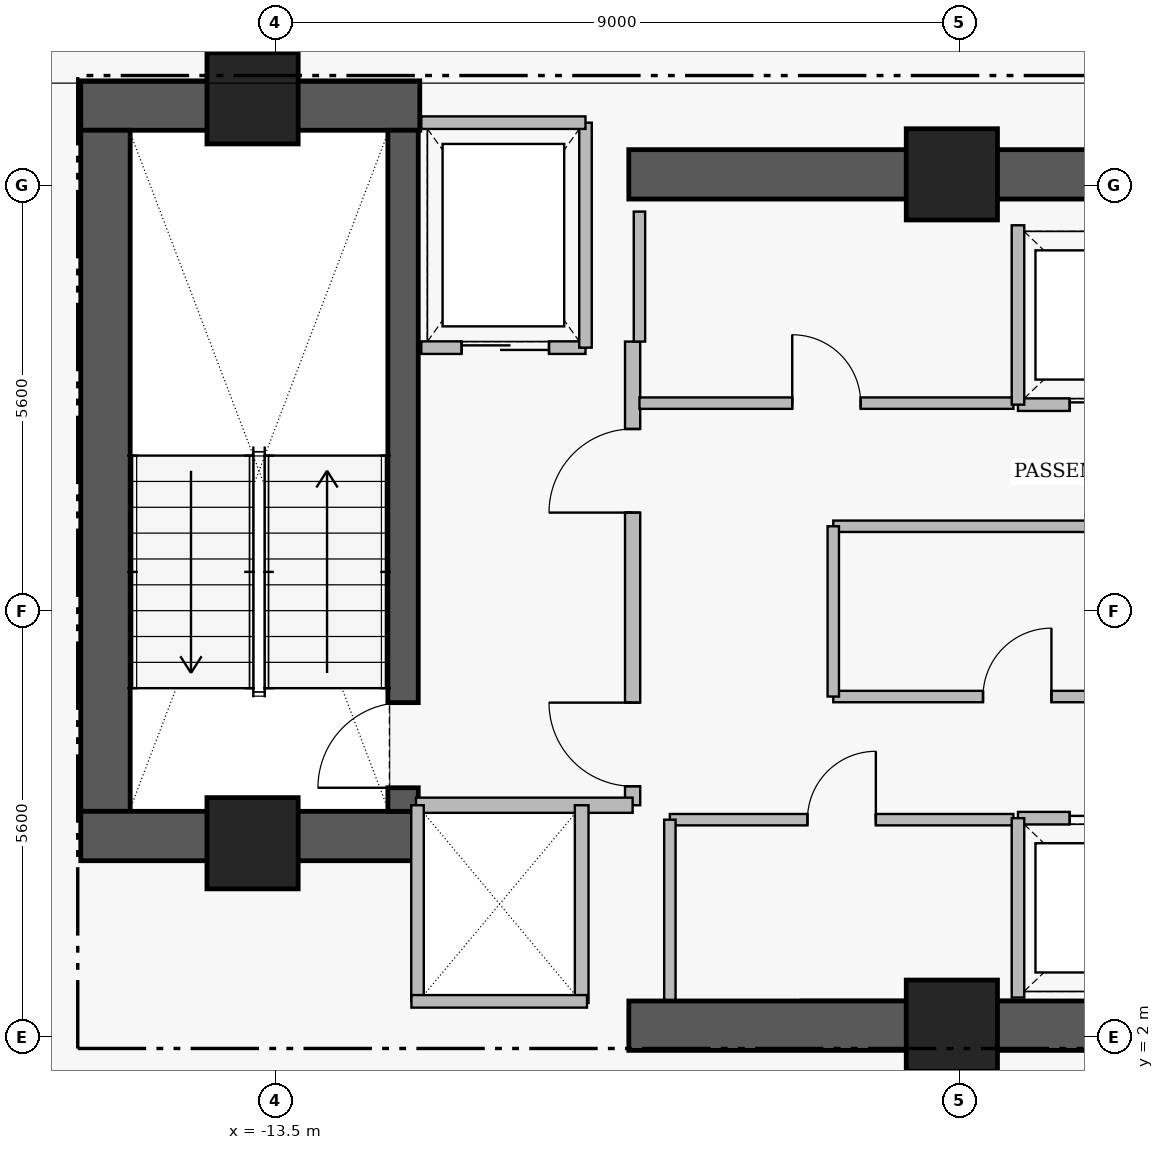
"""IFC4 building model, lengths in metres.
Left out: names, types, materials, properties, quantities, classifications, styles, units other than length and angle.
Written with IfcOpenShell. Run it as: python <this file> out.ifc"""

import sys

from ifc_helpers import new_model, si_unit, direction, frame, frame_2d, origin, origin_2d, place, context, subcontext, project, spatial, rectangle, extrude, element, fill, save


model = new_model("IFC4")
c1 = context("Model", 3, precision=1e-05, world=origin(), true_north=direction((0.0, 1.0)))
c2 = subcontext(c1, "Body", "Model", "MODEL_VIEW")
j1 = project(units=[si_unit("LENGTHUNIT", "METRE"), si_unit("PLANEANGLEUNIT", "RADIAN")], contexts=[c1])
p1 = place(None, origin())
s1 = spatial("IfcSite", under=j1, at=p1, CompositionType="ELEMENT")
p2 = place(p1, origin())
s2 = spatial("IfcBuilding", under=s1, at=p2, CompositionType="ELEMENT")
p3 = place(p2, frame((0.0, 0.0, 222.4)))
s3 = spatial("IfcBuildingStorey", under=s2, at=p3, CompositionType="ELEMENT", Elevation=222.4)
p4 = place(p3, frame((-16.06, 14.255, 0.0), z_axis=(0.0, 0.0, 1.0), x_axis=(1.0, 0.0, 0.0)))
e1 = element("IfcWall", 1, at=p4, inside=s3, PredefinedType="SHEAR", context=c2, shape_type="SweptSolid", body=[
    extrude(rectangle(XDim=4.46, YDim=0.65, at=frame_2d((2.23, 0.0))), origin(), (0.0, 0.0, 1.0), 3.56),
])
p5 = place(p3, frame((-15.735, 4.97, 0.0), z_axis=(0.0, 0.0, 1.0), x_axis=(0.0, 1.0, 0.0)))
e2 = element("IfcWall", 2, at=p5, inside=s3, PredefinedType="SHEAR", context=c2, shape_type="SweptSolid", body=[
    extrude(rectangle(XDim=8.96, YDim=0.65, at=frame_2d((4.48, 0.0))), origin(), (0.0, 0.0, 1.0), 3.56),
])
p6 = place(p3, frame((-16.06, 4.645, 0.0), z_axis=(0.0, 0.0, 1.0), x_axis=(1.0, 0.0, 0.0)))
e3 = element("IfcWall", 3, at=p6, inside=s3, PredefinedType="SHEAR", context=c2, shape_type="SweptSolid", body=[
    extrude(rectangle(XDim=4.46, YDim=0.65, at=frame_2d((2.23, 0.0))), origin(), (0.0, 0.0, 1.0), 3.56),
])
for number, where, z_axis, x_axis in (
    (4, (-8.85, 2.15, 0.0), (0.0, 0.0, 1.0), (1.0, 0.0, 0.0)),
    (5, (-8.85, 13.35, 0.0), (0.0, 0.0, 1.0), (1.0, 0.0, 0.0)),
):
    element("IfcWall", number, at=place(p3, frame(where, z_axis=z_axis, x_axis=x_axis)), inside=s3, PredefinedType="SHEAR", context=c2, shape_type="SweptSolid", body=[
        extrude(rectangle(XDim=7.6, YDim=0.65, at=frame_2d((3.8, 0.0))), origin(), (0.0, 0.0, 1.0), 3.53),
    ])
p7 = place(p3, frame((-11.82, 4.97, 0.0), z_axis=(0.0, 0.0, 1.0), x_axis=(0.0, 1.0, 0.0)))
e6 = element("IfcWall", 6, at=p7, inside=s3, PredefinedType="SHEAR", context=c2, shape_type="SweptSolid", body=[
    extrude(rectangle(XDim=8.96, YDim=0.4, at=frame_2d((4.48, 0.0))), origin(), (0.0, 0.0, 1.0), 3.56),
])
p8 = place(p7, frame((0.31, 0.0, 0.0)))
e7 = element("IfcOpeningElement", 7, at=p8, cuts=e6, PredefinedType="OPENING", context=c2, shape_type="SweptSolid", body=[
    extrude(rectangle(XDim=1.12, YDim=2.22, at=frame_2d((0.56, 1.11))), frame((0.0, 0.21, 0.0), z_axis=(0.0, -1.0, 0.0), x_axis=(1.0, 0.0, 0.0)), (0.0, 0.0, 1.0), 0.42),
])
for number, where, z_axis, x_axis in (
    (8, (-13.8, 14.35, 0.0), (0.0, 0.0, 1.0), (1.0, 0.0, 0.0)),
    (9, (-4.6, 13.35, 0.0), (0.0, 0.0, 1.0), (1.0, 0.0, 0.0)),
    (10, (-13.8, 4.55, 0.0), (0.0, 0.0, 1.0), (1.0, 0.0, 0.0)),
    (11, (-4.6, 2.15, 0.0), (0.0, 0.0, 1.0), (1.0, 0.0, 0.0)),
):
    element("IfcColumn", number, at=place(p3, frame(where, z_axis=z_axis, x_axis=x_axis)), inside=s3, PredefinedType="COLUMN", context=c2, shape_type="SweptSolid", body=[
        extrude(rectangle(XDim=1.2, YDim=1.2, at=origin_2d()), origin(), (0.0, 0.0, 1.0), 3.75),
    ])
p9 = place(p3, frame((-8.8, 5.05, 0.0), z_axis=(0.0, 0.0, 1.0), x_axis=(0.0, 1.0, 0.0)))
e12 = element("IfcWall", 12, at=p9, inside=s3, PredefinedType="PARTITIONING", context=c2, shape_type="SweptSolid", body=[
    extrude(rectangle(XDim=6.1, YDim=0.2, at=frame_2d((3.05, 0.0))), origin(), (0.0, 0.0, 1.0), 3.53),
])
p10 = place(p9, frame((0.25, 0.0, 0.0)))
e13 = element("IfcOpeningElement", 13, at=p10, cuts=e12, PredefinedType="OPENING", context=c2, shape_type="SweptSolid", body=[
    extrude(rectangle(XDim=1.1, YDim=2.2, at=frame_2d((0.55, 1.1))), frame((0.0, 0.11, 0.0), z_axis=(0.0, -1.0, 0.0), x_axis=(1.0, 0.0, 0.0)), (0.0, 0.0, 1.0), 0.22),
])
p11 = place(p9, frame((3.85, 0.0, 0.0)))
e14 = element("IfcOpeningElement", 14, at=p11, cuts=e12, PredefinedType="OPENING", context=c2, shape_type="SweptSolid", body=[
    extrude(rectangle(XDim=1.1, YDim=2.2, at=frame_2d((0.55, 1.1))), frame((0.0, 0.11, 0.0), z_axis=(0.0, -1.0, 0.0), x_axis=(1.0, 0.0, 0.0)), (0.0, 0.0, 1.0), 0.22),
])
p12 = place(p3, frame((-11.58, 11.07, 0.0), z_axis=(0.0, 0.0, 1.0), x_axis=(1.0, 0.0, 0.0)))
e15 = element("IfcWall", 15, at=p12, inside=s3, PredefinedType="PARTITIONING", context=c2, shape_type="SweptSolid", body=[
    extrude(rectangle(XDim=2.16, YDim=0.165, at=frame_2d((1.08, 0.0))), origin(), (0.0, 0.0, 1.0), 3.53),
])
p13 = place(p12, frame((0.53, 0.0, 0.0)))
e16 = element("IfcOpeningElement", 16, at=p13, cuts=e15, PredefinedType="OPENING", context=c2, shape_type="SweptSolid", body=[
    extrude(rectangle(XDim=1.15, YDim=2.25, at=frame_2d((0.575, 1.125))), frame((0.0, 0.093, 0.0), z_axis=(0.0, -1.0, 0.0), x_axis=(1.0, 0.0, 0.0)), (0.0, 0.0, 1.0), 0.185),
])
p14 = place(p3, frame((-3.73, 4.88, 0.0), z_axis=(0.0, 0.0, 1.0), x_axis=(1.0, 0.0, 0.0)))
e17 = element("IfcWall", 17, at=p14, inside=s3, PredefinedType="PARTITIONING", context=c2, shape_type="SweptSolid", body=[
    extrude(rectangle(XDim=2.46, YDim=0.165, at=frame_2d((1.23, 0.0))), origin(), (0.0, 0.0, 1.0), 3.53),
])
p15 = place(p14, frame((0.68, 0.0, 0.0)))
e18 = element("IfcOpeningElement", 18, at=p15, cuts=e17, PredefinedType="OPENING", context=c2, shape_type="SweptSolid", body=[
    extrude(rectangle(XDim=1.1, YDim=2.25, at=frame_2d((0.55, 1.125))), frame((0.0, 0.093, 0.0), z_axis=(0.0, -1.0, 0.0), x_axis=(1.0, 0.0, 0.0)), (0.0, 0.0, 1.0), 0.185),
])
p16 = place(p3, frame((-3.73, 10.32, 0.0), z_axis=(0.0, 0.0, 1.0), x_axis=(1.0, 0.0, 0.0)))
e19 = element("IfcWall", 19, at=p16, inside=s3, PredefinedType="PARTITIONING", context=c2, shape_type="SweptSolid", body=[
    extrude(rectangle(XDim=2.46, YDim=0.165, at=frame_2d((1.23, 0.0))), origin(), (0.0, 0.0, 1.0), 3.53),
])
p17 = place(p16, frame((0.68, 0.0, 0.0)))
e20 = element("IfcOpeningElement", 20, at=p17, cuts=e19, PredefinedType="OPENING", context=c2, shape_type="SweptSolid", body=[
    extrude(rectangle(XDim=1.1, YDim=2.25, at=frame_2d((0.55, 1.125))), frame((0.0, 0.093, 0.0), z_axis=(0.0, -1.0, 0.0), x_axis=(1.0, 0.0, 0.0)), (0.0, 0.0, 1.0), 0.185),
])
p18 = place(p3, frame((-8.31, 4.86, 0.0), z_axis=(0.0, 0.0, 1.0), x_axis=(1.0, 0.0, 0.0)))
e21 = element("IfcWall", 21, at=p18, inside=s3, PredefinedType="PARTITIONING", context=c2, shape_type="SweptSolid", body=[
    extrude(rectangle(XDim=4.52, YDim=0.15, at=frame_2d((2.26, 0.0))), origin(), (0.0, 0.0, 1.0), 3.53),
])
p19 = place(p18, frame((1.81, 0.0, 0.0)))
e22 = element("IfcOpeningElement", 22, at=p19, cuts=e21, PredefinedType="OPENING", context=c2, shape_type="SweptSolid", body=[
    extrude(rectangle(XDim=0.9, YDim=2.15, at=frame_2d((0.45, 1.075))), frame((0.0, 0.085, 0.0), z_axis=(0.0, -1.0, 0.0), x_axis=(1.0, 0.0, 0.0)), (0.0, 0.0, 1.0), 0.17),
])
p20 = place(p3, frame((-8.71, 10.34, 0.0), z_axis=(0.0, 0.0, 1.0), x_axis=(1.0, 0.0, 0.0)))
e23 = element("IfcWall", 23, at=p20, inside=s3, PredefinedType="PARTITIONING", context=c2, shape_type="SweptSolid", body=[
    extrude(rectangle(XDim=4.92, YDim=0.15, at=frame_2d((2.46, 0.0))), origin(), (0.0, 0.0, 1.0), 3.53),
])
p21 = place(p20, frame((2.01, 0.0, 0.0)))
e24 = element("IfcOpeningElement", 24, at=p21, cuts=e23, PredefinedType="OPENING", context=c2, shape_type="SweptSolid", body=[
    extrude(rectangle(XDim=0.9, YDim=2.15, at=frame_2d((0.45, 1.075))), frame((0.0, 0.085, 0.0), z_axis=(0.0, -1.0, 0.0), x_axis=(1.0, 0.0, 0.0)), (0.0, 0.0, 1.0), 0.17),
])
p22 = place(p3, frame((-6.16, 6.48, 0.0), z_axis=(0.0, 0.0, 1.0), x_axis=(1.0, 0.0, 0.0)))
e25 = element("IfcWall", 25, at=p22, inside=s3, PredefinedType="PARTITIONING", context=c2, shape_type="SweptSolid", body=[
    extrude(rectangle(XDim=4.84, YDim=0.15, at=frame_2d((2.42, 0.0))), origin(), (0.0, 0.0, 1.0), 3.53),
])
p23 = place(p22, frame((1.97, 0.0, 0.0)))
e26 = element("IfcOpeningElement", 26, at=p23, cuts=e25, PredefinedType="OPENING", context=c2, shape_type="SweptSolid", body=[
    extrude(rectangle(XDim=0.9, YDim=2.15, at=frame_2d((0.45, 1.075))), frame((0.0, 0.085, 0.0), z_axis=(0.0, -1.0, 0.0), x_axis=(1.0, 0.0, 0.0)), (0.0, 0.0, 1.0), 0.17),
])
p24 = place(p3, frame((-11.65, 5.05, 0.0), z_axis=(0.0, 0.0, 1.0), x_axis=(1.0, 0.0, 0.0)))
e27 = element("IfcWall", 27, at=p24, inside=s3, PredefinedType="PARTITIONING", context=c2, shape_type="SweptSolid", body=[
    extrude(rectangle(XDim=2.85, YDim=0.2, at=frame_2d((1.425, 0.0))), origin(), (0.0, 0.0, 1.0), 3.53),
])
p25 = place(p3, frame((-9.42, 11.07, 0.0), z_axis=(0.0, 0.0, 1.0), x_axis=(0.0, 1.0, 0.0)))
e28 = element("IfcWall", 28, at=p25, inside=s3, PredefinedType="PARTITIONING", context=c2, shape_type="SweptSolid", body=[
    extrude(rectangle(XDim=2.96, YDim=0.165, at=frame_2d((1.48, 0.0))), origin(), (0.0, 0.0, 1.0), 3.53),
])
p26 = place(p3, frame((-11.58, 14.03, 0.0), z_axis=(0.0, 0.0, 1.0), x_axis=(1.0, 0.0, 0.0)))
e29 = element("IfcWall", 29, at=p26, inside=s3, PredefinedType="PARTITIONING", context=c2, shape_type="SweptSolid", body=[
    extrude(rectangle(XDim=2.16, YDim=0.165, at=frame_2d((1.08, 0.0))), origin(), (0.0, 0.0, 1.0), 3.53),
])
for number, where, z_axis, x_axis in (
    (30, (-3.73, 2.52, 0.0), (0.0, 0.0, 1.0), (0.0, 1.0, 0.0)),
    (31, (-3.73, 10.32, 0.0), (0.0, 0.0, 1.0), (0.0, 1.0, 0.0)),
):
    element("IfcWall", number, at=place(p3, frame(where, z_axis=z_axis, x_axis=x_axis)), inside=s3, PredefinedType="PARTITIONING", context=c2, shape_type="SweptSolid", body=[
        extrude(rectangle(XDim=2.36, YDim=0.165, at=frame_2d((1.18, 0.0))), origin(), (0.0, 0.0, 1.0), 3.53),
    ])
p27 = place(p3, frame((-8.31, 2.49, 0.0), z_axis=(0.0, 0.0, 1.0), x_axis=(0.0, 1.0, 0.0)))
e32 = element("IfcWall", 32, at=p27, inside=s3, PredefinedType="PARTITIONING", context=c2, shape_type="SweptSolid", body=[
    extrude(rectangle(XDim=2.37, YDim=0.15, at=frame_2d((1.185, 0.0))), origin(), (0.0, 0.0, 1.0), 3.53),
])
p28 = place(p3, frame((-8.71, 11.15, 0.0), z_axis=(0.0, 0.0, 1.0), x_axis=(0.0, 1.0, 0.0)))
e33 = element("IfcWall", 33, at=p28, inside=s3, PredefinedType="PARTITIONING", context=c2, shape_type="SweptSolid", body=[
    extrude(rectangle(XDim=1.71, YDim=0.15, at=frame_2d((0.855, 0.0))), origin(), (0.0, 0.0, 1.0), 3.53),
])
p29 = place(p3, frame((-9.47, 2.45, 0.0), z_axis=(0.0, 0.0, 1.0), x_axis=(0.0, 1.0, 0.0)))
e34 = element("IfcWall", 34, at=p29, inside=s3, PredefinedType="PARTITIONING", context=c2, shape_type="SweptSolid", body=[
    extrude(rectangle(XDim=2.6, YDim=0.18, at=frame_2d((1.3, 0.0))), origin(), (0.0, 0.0, 1.0), 3.53),
])
p30 = place(p3, frame((-11.63, 2.47, 0.0), z_axis=(0.0, 0.0, 1.0), x_axis=(0.0, 1.0, 0.0)))
e35 = element("IfcWall", 35, at=p30, inside=s3, PredefinedType="PARTITIONING", context=c2, shape_type="SweptSolid", body=[
    extrude(rectangle(XDim=2.58, YDim=0.165, at=frame_2d((1.29, 0.0))), origin(), (0.0, 0.0, 1.0), 3.53),
])
p31 = place(p3, frame((-11.71, 2.47, 0.0), z_axis=(0.0, 0.0, 1.0), x_axis=(1.0, 0.0, 0.0)))
e36 = element("IfcWall", 36, at=p31, inside=s3, PredefinedType="PARTITIONING", context=c2, shape_type="SweptSolid", body=[
    extrude(rectangle(XDim=2.31, YDim=0.165, at=frame_2d((1.155, 0.0))), origin(), (0.0, 0.0, 1.0), 2.43),
])
p32 = place(p3, frame((-6.16, 8.72, 0.0), z_axis=(0.0, 0.0, 1.0), x_axis=(1.0, 0.0, 0.0)))
e37 = element("IfcWall", 37, at=p32, inside=s3, PredefinedType="PARTITIONING", context=c2, shape_type="SweptSolid", body=[
    extrude(rectangle(XDim=4.84, YDim=0.15, at=frame_2d((2.42, 0.0))), origin(), (0.0, 0.0, 1.0), 3.53),
])
p33 = place(p3, frame((-6.16, 6.48, 0.0), z_axis=(0.0, 0.0, 1.0), x_axis=(0.0, 1.0, 0.0)))
e38 = element("IfcWall", 38, at=p33, inside=s3, PredefinedType="PARTITIONING", context=c2, shape_type="SweptSolid", body=[
    extrude(rectangle(XDim=2.24, YDim=0.15, at=frame_2d((1.12, 0.0))), origin(), (0.0, 0.0, 1.0), 3.53),
])
p34 = place(p8, origin())
e39 = element("IfcDoor", 39, at=p34, inside=s3, OperationType="SINGLE_SWING_LEFT", PredefinedType="DOOR", context=c2, shape_type="SweptSolid", body=[
    extrude(rectangle(XDim=1.12, YDim=2.22, at=frame_2d((0.56, 1.11))), frame((0.0, 0.025, 0.0), z_axis=(0.0, -1.0, 0.0), x_axis=(1.0, 0.0, 0.0)), (0.0, 0.0, 1.0), 0.05),
])
fill(e7, e39)
p35 = place(p10, origin())
e40 = element("IfcDoor", 40, at=p35, inside=s3, OperationType="SINGLE_SWING_RIGHT", PredefinedType="DOOR", context=c2, shape_type="SweptSolid", body=[
    extrude(rectangle(XDim=1.1, YDim=2.2, at=frame_2d((0.55, 1.1))), frame((0.0, 0.025, 0.0), z_axis=(0.0, -1.0, 0.0), x_axis=(1.0, 0.0, 0.0)), (0.0, 0.0, 1.0), 0.05),
])
fill(e13, e40)
p36 = place(p11, origin())
e41 = element("IfcDoor", 41, at=p36, inside=s3, OperationType="SINGLE_SWING_LEFT", PredefinedType="DOOR", context=c2, shape_type="SweptSolid", body=[
    extrude(rectangle(XDim=1.1, YDim=2.2, at=frame_2d((0.55, 1.1))), frame((0.0, 0.025, 0.0), z_axis=(0.0, -1.0, 0.0), x_axis=(1.0, 0.0, 0.0)), (0.0, 0.0, 1.0), 0.05),
])
fill(e14, e41)
p37 = place(p13, origin())
e42 = element("IfcDoor", 42, at=p37, inside=s3, OperationType="SLIDING_TO_LEFT", PredefinedType="DOOR", context=c2, shape_type="SweptSolid", body=[
    extrude(rectangle(XDim=1.15, YDim=2.25, at=frame_2d((0.575, 1.125))), frame((0.0, 0.025, 0.0), z_axis=(0.0, -1.0, 0.0), x_axis=(1.0, 0.0, 0.0)), (0.0, 0.0, 1.0), 0.05),
])
fill(e16, e42)
p38 = place(p15, origin())
e43 = element("IfcDoor", 43, at=p38, inside=s3, OperationType="SLIDING_TO_LEFT", PredefinedType="DOOR", context=c2, shape_type="SweptSolid", body=[
    extrude(rectangle(XDim=1.1, YDim=2.25, at=frame_2d((0.55, 1.125))), frame((0.0, 0.025, 0.0), z_axis=(0.0, -1.0, 0.0), x_axis=(1.0, 0.0, 0.0)), (0.0, 0.0, 1.0), 0.05),
])
fill(e18, e43)
p39 = place(p17, origin())
e44 = element("IfcDoor", 44, at=p39, inside=s3, OperationType="SLIDING_TO_LEFT", PredefinedType="DOOR", context=c2, shape_type="SweptSolid", body=[
    extrude(rectangle(XDim=1.1, YDim=2.25, at=frame_2d((0.55, 1.125))), frame((0.0, 0.025, 0.0), z_axis=(0.0, -1.0, 0.0), x_axis=(1.0, 0.0, 0.0)), (0.0, 0.0, 1.0), 0.05),
])
fill(e20, e44)
p40 = place(p19, origin())
e45 = element("IfcDoor", 45, at=p40, inside=s3, OperationType="SINGLE_SWING_RIGHT", PredefinedType="DOOR", context=c2, shape_type="SweptSolid", body=[
    extrude(rectangle(XDim=0.9, YDim=2.15, at=frame_2d((0.45, 1.075))), frame((0.0, 0.025, 0.0), z_axis=(0.0, -1.0, 0.0), x_axis=(1.0, 0.0, 0.0)), (0.0, 0.0, 1.0), 0.05),
])
fill(e22, e45)
p41 = place(p21, origin())
e46 = element("IfcDoor", 46, at=p41, inside=s3, OperationType="SINGLE_SWING_LEFT", PredefinedType="DOOR", context=c2, shape_type="SweptSolid", body=[
    extrude(rectangle(XDim=0.9, YDim=2.15, at=frame_2d((0.45, 1.075))), frame((0.0, 0.025, 0.0), z_axis=(0.0, -1.0, 0.0), x_axis=(1.0, 0.0, 0.0)), (0.0, 0.0, 1.0), 0.05),
])
fill(e24, e46)
p42 = place(p23, origin())
e47 = element("IfcDoor", 47, at=p42, inside=s3, OperationType="SINGLE_SWING_RIGHT", PredefinedType="DOOR", context=c2, shape_type="SweptSolid", body=[
    extrude(rectangle(XDim=0.9, YDim=2.15, at=frame_2d((0.45, 1.075))), frame((0.0, 0.025, 0.0), z_axis=(0.0, -1.0, 0.0), x_axis=(1.0, 0.0, 0.0)), (0.0, 0.0, 1.0), 0.05),
])
fill(e26, e47)
save(model, sys.argv[1])
